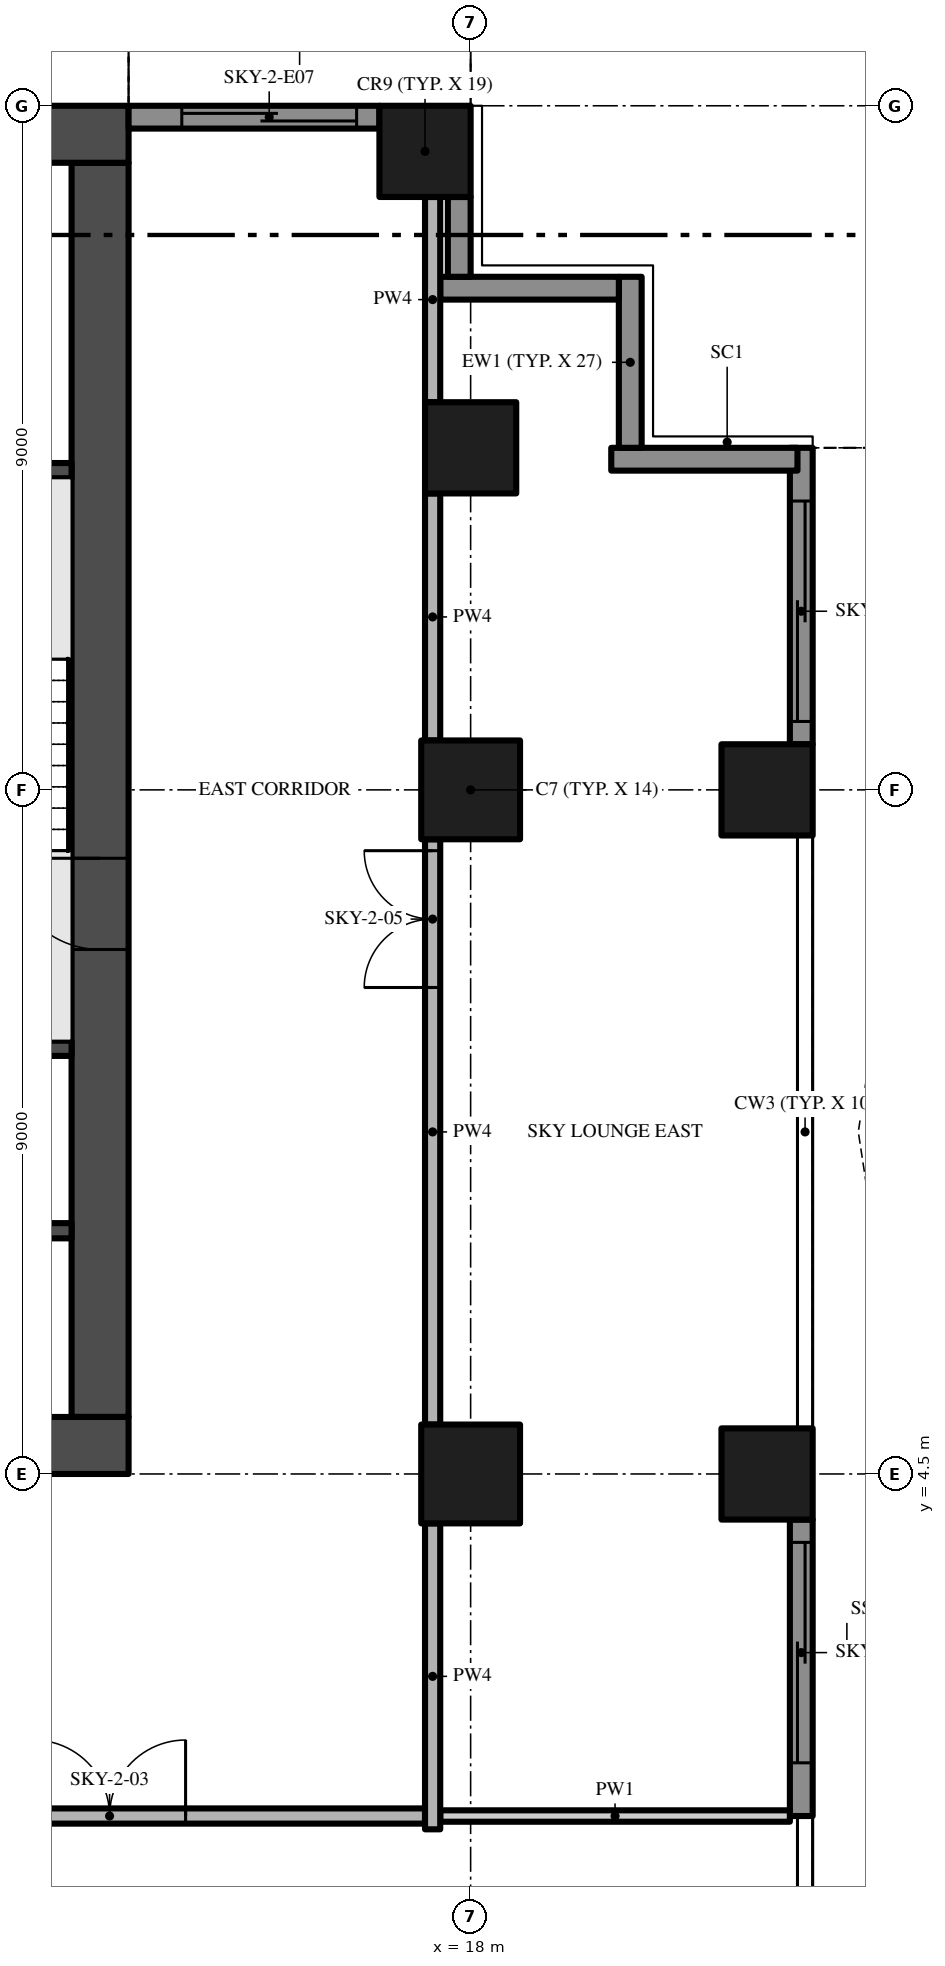
"""IFC4 building model, lengths in metres.
Left out: names, types, materials, properties, quantities, classifications, styles, units other than length and angle.
Written with IfcOpenShell. Run it as: python <this file> out.ifc"""

import sys

from ifc_helpers import new_model, si_unit, direction, frame, frame_2d, origin, origin_2d, place, context, subcontext, project, spatial, polyline, rectangle, outline, extrude, element, fill, save


model = new_model("IFC4")
c1 = context("Model", 3, precision=1e-05, world=origin(), true_north=direction((0.0, 1.0)))
c2 = subcontext(c1, "Body", "Model", "MODEL_VIEW")
j1 = project(units=[si_unit("LENGTHUNIT", "METRE"), si_unit("PLANEANGLEUNIT", "RADIAN")], contexts=[c1])
p1 = place(None, origin())
s1 = spatial("IfcSite", under=j1, at=p1, CompositionType="ELEMENT")
p2 = place(p1, origin())
s2 = spatial("IfcBuilding", under=s1, at=p2, CompositionType="ELEMENT")
p3 = place(p2, frame((0.0, 0.0, 120.0)))
s3 = spatial("IfcBuildingStorey", under=s2, at=p3, CompositionType="ELEMENT", Elevation=120.0)
p4 = place(p3, frame((-13.5, 4.875, -0.3), z_axis=(0.0, 0.0, 1.0), x_axis=(1.0, 0.0, 0.0)))
e1 = element("IfcWall", 1, at=p4, inside=s3, PredefinedType="SHEAR", context=c2, shape_type="SweptSolid", body=[
    extrude(rectangle(XDim=27.0, YDim=0.75, at=frame_2d((13.5, 0.0))), origin(), (0.0, 0.0, 1.0), 5.0),
])
p5 = place(p4, frame((12.0, 0.0, 0.3)))
e2 = element("IfcOpeningElement", 2, at=p5, cuts=e1, PredefinedType="OPENING", context=c2, shape_type="SweptSolid", body=[
    extrude(rectangle(XDim=3.0, YDim=2.4, at=frame_2d((1.5, 1.2))), frame((0.0, 0.385, 0.0), z_axis=(0.0, -1.0, 0.0), x_axis=(1.0, 0.0, 0.0)), (0.0, 0.0, 1.0), 0.77),
])
p6 = place(p4, frame((4.9, 0.0, 0.3)))
e3 = element("IfcOpeningElement", 3, at=p6, cuts=e1, PredefinedType="OPENING", context=c2, shape_type="SweptSolid", body=[
    extrude(rectangle(XDim=1.2, YDim=2.2, at=frame_2d((0.6, 1.1))), frame((0.0, 0.385, 0.0), z_axis=(0.0, -1.0, 0.0), x_axis=(1.0, 0.0, 0.0)), (0.0, 0.0, 1.0), 0.77),
])
p7 = place(p4, frame((20.75, 0.0, 0.3)))
e4 = element("IfcOpeningElement", 4, at=p7, cuts=e1, PredefinedType="OPENING", context=c2, shape_type="SweptSolid", body=[
    extrude(rectangle(XDim=1.5, YDim=2.2, at=frame_2d((0.75, 1.1))), frame((0.0, 0.385, 0.0), z_axis=(0.0, -1.0, 0.0), x_axis=(1.0, 0.0, 0.0)), (0.0, 0.0, 1.0), 0.77),
])
p8 = place(p4, frame((17.4, 0.0, 0.3)))
e5 = element("IfcOpeningElement", 5, at=p8, cuts=e1, PredefinedType="OPENING", context=c2, shape_type="SweptSolid", body=[
    extrude(rectangle(XDim=1.2, YDim=2.2, at=frame_2d((0.6, 1.1))), frame((0.0, 0.385, 0.0), z_axis=(0.0, -1.0, 0.0), x_axis=(1.0, 0.0, 0.0)), (0.0, 0.0, 1.0), 0.77),
])
p9 = place(p3, frame((13.125, 5.25, -0.3), z_axis=(0.0, 0.0, 1.0), x_axis=(0.0, 1.0, 0.0)))
e6 = element("IfcWall", 6, at=p9, inside=s3, PredefinedType="SHEAR", context=c2, shape_type="SweptSolid", body=[
    extrude(rectangle(XDim=16.5, YDim=0.75, at=frame_2d((8.25, 0.0))), origin(), (0.0, 0.0, 1.0), 5.0),
])
p10 = place(p9, frame((6.15, 0.0, 0.3)))
e7 = element("IfcOpeningElement", 7, at=p10, cuts=e6, PredefinedType="OPENING", context=c2, shape_type="SweptSolid", body=[
    extrude(rectangle(XDim=1.2, YDim=2.2, at=frame_2d((0.6, 1.1))), frame((0.0, 0.385, 0.0), z_axis=(0.0, -1.0, 0.0), x_axis=(1.0, 0.0, 0.0)), (0.0, 0.0, 1.0), 0.77),
])
p11 = place(p3, frame((13.5, 22.125, -0.3), z_axis=(0.0, 0.0, 1.0), x_axis=(-1.0, 0.0, 0.0)))
e8 = element("IfcWall", 8, at=p11, inside=s3, PredefinedType="SHEAR", context=c2, shape_type="SweptSolid", body=[
    extrude(rectangle(XDim=27.0, YDim=0.75, at=frame_2d((13.5, 0.0))), origin(), (0.0, 0.0, 1.0), 5.0),
])
p12 = place(p3, frame((18.0, 13.5, 0.0), z_axis=(0.0, 0.0, 1.0), x_axis=(1.0, 0.0, 0.0)))
e9 = element("IfcColumn", 9, at=p12, inside=s3, PredefinedType="COLUMN", context=c2, shape_type="SweptSolid", body=[
    extrude(rectangle(XDim=1.3, YDim=1.3, at=origin_2d()), origin(), (0.0, 0.0, 1.0), 4.7),
])
p13 = place(p3, frame((17.4, 21.9, 0.0), z_axis=(0.0, 0.0, 1.0), x_axis=(1.0, 0.0, 0.0)))
e10 = element("IfcColumn", 10, at=p13, inside=s3, PredefinedType="COLUMN", context=c2, shape_type="SweptSolid", body=[
    extrude(rectangle(XDim=1.2, YDim=1.2, at=origin_2d()), origin(), (0.0, 0.0, 1.0), 4.7),
])
p14 = place(p3, frame((18.0, 4.5, 0.0), z_axis=(0.0, 0.0, 1.0), x_axis=(1.0, 0.0, 0.0)))
e11 = element("IfcColumn", 11, at=p14, inside=s3, PredefinedType="COLUMN", context=c2, shape_type="SweptSolid", body=[
    extrude(rectangle(XDim=1.3, YDim=1.3, at=origin_2d()), origin(), (0.0, 0.0, 1.0), 4.7),
])
for number, where, z_axis, x_axis in (
    (12, (21.9, 13.5, 0.0), (0.0, 0.0, 1.0), (1.0, 0.0, 0.0)),
    (13, (18.0, 18.0, 0.0), (0.0, 0.0, 1.0), (1.0, 0.0, 0.0)),
    (14, (21.9, 4.5, 0.0), (0.0, 0.0, 1.0), (1.0, 0.0, 0.0)),
):
    element("IfcColumn", number, at=place(p3, frame(where, z_axis=z_axis, x_axis=x_axis)), inside=s3, PredefinedType="COLUMN", context=c2, shape_type="SweptSolid", body=[
        extrude(rectangle(XDim=1.2, YDim=1.2, at=origin_2d()), origin(), (0.0, 0.0, 1.0), 4.7),
    ])
p15 = place(p3, frame((22.35, 3.9, 0.0), z_axis=(0.0, 0.0, 1.0), x_axis=(0.0, -1.0, 0.0)))
e15 = element("IfcWall", 15, at=p15, inside=s3, PredefinedType="SOLIDWALL", context=c2, shape_type="SweptSolid", body=[
    extrude(rectangle(XDim=3.9, YDim=0.3, at=frame_2d((1.95, 0.0))), origin(), (0.0, 0.0, 1.0), 4.7),
])
p16 = place(p15, frame((0.3, 0.0, 0.0)))
e16 = element("IfcOpeningElement", 16, at=p16, cuts=e15, PredefinedType="OPENING", context=c2, shape_type="SweptSolid", body=[
    extrude(rectangle(XDim=2.9, YDim=2.4, at=frame_2d((1.45, 1.2))), frame((0.0, 0.16, 0.0), z_axis=(0.0, -1.0, 0.0), x_axis=(1.0, 0.0, 0.0)), (0.0, 0.0, 1.0), 0.32),
])
p17 = place(p3, frame((22.35, 18.0, 0.0), z_axis=(0.0, 0.0, 1.0), x_axis=(0.0, -1.0, 0.0)))
e17 = element("IfcWall", 17, at=p17, inside=s3, PredefinedType="SOLIDWALL", context=c2, shape_type="SweptSolid", body=[
    extrude(rectangle(XDim=3.9, YDim=0.3, at=frame_2d((1.95, 0.0))), origin(), (0.0, 0.0, 1.0), 4.7),
])
p18 = place(p17, frame((0.7, 0.0, 0.0)))
e18 = element("IfcOpeningElement", 18, at=p18, cuts=e17, PredefinedType="OPENING", context=c2, shape_type="SweptSolid", body=[
    extrude(rectangle(XDim=2.9, YDim=2.4, at=frame_2d((1.45, 1.2))), frame((0.0, 0.16, 0.0), z_axis=(0.0, -1.0, 0.0), x_axis=(1.0, 0.0, 0.0)), (0.0, 0.0, 1.0), 0.32),
])
p19 = place(p3, frame((19.85, 17.85, 0.0), z_axis=(0.0, 0.0, 1.0), x_axis=(1.0, 0.0, 0.0)))
e19 = element("IfcWall", 19, at=p19, inside=s3, PredefinedType="SOLIDWALL", context=c2, shape_type="SweptSolid", body=[
    extrude(rectangle(XDim=2.45, YDim=0.3, at=frame_2d((1.225, 0.0))), origin(), (0.0, 0.0, 1.0), 4.7),
])
p20 = place(p3, frame((20.1, 20.25, 0.0), z_axis=(0.0, 0.0, 1.0), x_axis=(0.0, -1.0, 0.0)))
e20 = element("IfcWall", 20, at=p20, inside=s3, PredefinedType="SOLIDWALL", context=c2, shape_type="SweptSolid", body=[
    extrude(rectangle(XDim=2.25, YDim=0.3, at=frame_2d((1.125, 0.0))), origin(), (0.0, 0.0, 1.0), 4.7),
])
p21 = place(p3, frame((17.6, 20.1, 0.0), z_axis=(0.0, 0.0, 1.0), x_axis=(1.0, 0.0, 0.0)))
e21 = element("IfcWall", 21, at=p21, inside=s3, PredefinedType="SOLIDWALL", context=c2, shape_type="SweptSolid", body=[
    extrude(rectangle(XDim=2.35, YDim=0.3, at=frame_2d((1.175, 0.0))), origin(), (0.0, 0.0, 1.0), 4.7),
])
p22 = place(p3, frame((17.85, 21.3, 0.0), z_axis=(0.0, 0.0, 1.0), x_axis=(0.0, -1.0, 0.0)))
e22 = element("IfcWall", 22, at=p22, inside=s3, PredefinedType="SOLIDWALL", context=c2, shape_type="SweptSolid", body=[
    extrude(rectangle(XDim=1.05, YDim=0.3, at=frame_2d((0.525, 0.0))), origin(), (0.0, 0.0, 1.0), 4.7),
])
p23 = place(p3, frame((13.5, 22.35, 0.0), z_axis=(0.0, 0.0, 1.0), x_axis=(1.0, 0.0, 0.0)))
e23 = element("IfcWall", 23, at=p23, inside=s3, PredefinedType="SOLIDWALL", context=c2, shape_type="SweptSolid", body=[
    extrude(rectangle(XDim=3.3, YDim=0.3, at=frame_2d((1.65, 0.0))), origin(), (0.0, 0.0, 1.0), 4.7),
])
p24 = place(p23, frame((0.7, 0.0, 0.0)))
e24 = element("IfcOpeningElement", 24, at=p24, cuts=e23, PredefinedType="OPENING", context=c2, shape_type="SweptSolid", body=[
    extrude(rectangle(XDim=2.3, YDim=2.4, at=frame_2d((1.15, 1.2))), frame((0.0, 0.16, 0.0), z_axis=(0.0, -1.0, 0.0), x_axis=(1.0, 0.0, 0.0)), (0.0, 0.0, 1.0), 0.32),
])
p25 = place(p3, origin())
e25 = element("IfcWall", 25, at=p25, inside=s3, PredefinedType="USERDEFINED", context=c2, shape_type="SweptSolid", body=[
    extrude(outline(polyline([(25.5, -13.5), (25.271, -12.0), (24.671, -10.5), (23.929, -9.0), (23.329, -7.5), (23.1, -6.0), (23.329, -4.5), (23.929, -3.0), (24.671, -1.5), (25.271, 0.0), (25.5, 1.5), (25.271, 3.0), (24.671, 4.5), (23.929, 6.0), (23.329, 7.5), (23.1, 9.0), (23.329, 10.5), (23.929, 12.0), (24.671, 13.5), (25.271, 15.0), (25.5, 16.5), (25.271, 18.0), (25.024, 17.962), (25.247, 16.5), (25.028, 15.066), (24.442, 13.602), (23.701, 12.102), (23.086, 10.566), (22.847, 9.0), (23.086, 7.434), (23.701, 5.898), (24.442, 4.398), (25.028, 2.934), (25.247, 1.5), (25.028, 0.066), (24.442, -1.398), (23.701, -2.898), (23.086, -4.434), (22.847, -6.0), (23.086, -7.566), (23.701, -9.102), (24.442, -10.602), (25.028, -12.066), (25.253, -13.538), (25.5, -13.5)])), origin(), (0.0, 0.0, 1.0), 0.9),
])
for number, where, z_axis, x_axis in (
    (26, (9.65, 7.7, 0.0), (0.0, 0.0, 1.0), (1.0, 0.0, 0.0)),
    (27, (9.65, 10.1, 0.0), (0.0, 0.0, 1.0), (1.0, 0.0, 0.0)),
    (28, (9.65, 17.7, 0.0), (0.0, 0.0, 1.0), (1.0, 0.0, 0.0)),
):
    element("IfcWall", number, at=place(p3, frame(where, z_axis=z_axis, x_axis=x_axis)), inside=s3, PredefinedType="SHEAR", context=c2, shape_type="SweptSolid", body=[
        extrude(rectangle(XDim=3.1, YDim=0.2, at=frame_2d((1.55, 0.0))), origin(), (0.0, 0.0, 1.0), 4.7),
    ])
p26 = place(p3, frame((-17.4, 0.0, 0.0), z_axis=(0.0, 0.0, 1.0), x_axis=(1.0, 0.0, 0.0)))
e29 = element("IfcWall", 29, at=p26, inside=s3, PredefinedType="PARTITIONING", context=c2, shape_type="SweptSolid", body=[
    extrude(rectangle(XDim=34.8, YDim=0.2, at=frame_2d((17.4, 0.0))), origin(), (0.0, 0.0, 1.0), 4.7),
])
p27 = place(p26, frame((3.15, 0.0, 0.0)))
e30 = element("IfcOpeningElement", 30, at=p27, cuts=e29, PredefinedType="OPENING", context=c2, shape_type="SweptSolid", body=[
    extrude(rectangle(XDim=2.0, YDim=2.4, at=frame_2d((1.0, 1.2))), frame((0.0, 0.11, 0.0), z_axis=(0.0, -1.0, 0.0), x_axis=(1.0, 0.0, 0.0)), (0.0, 0.0, 1.0), 0.22),
])
p28 = place(p26, frame((16.4, 0.0, 0.0)))
e31 = element("IfcOpeningElement", 31, at=p28, cuts=e29, PredefinedType="OPENING", context=c2, shape_type="SweptSolid", body=[
    extrude(rectangle(XDim=2.0, YDim=2.4, at=frame_2d((1.0, 1.2))), frame((0.0, 0.11, 0.0), z_axis=(0.0, -1.0, 0.0), x_axis=(1.0, 0.0, 0.0)), (0.0, 0.0, 1.0), 0.22),
])
p29 = place(p26, frame((29.65, 0.0, 0.0)))
e32 = element("IfcOpeningElement", 32, at=p29, cuts=e29, PredefinedType="OPENING", context=c2, shape_type="SweptSolid", body=[
    extrude(rectangle(XDim=2.0, YDim=2.4, at=frame_2d((1.0, 1.2))), frame((0.0, 0.11, 0.0), z_axis=(0.0, -1.0, 0.0), x_axis=(1.0, 0.0, 0.0)), (0.0, 0.0, 1.0), 0.22),
])
p30 = place(p3, frame((17.6, 0.0, 0.0), z_axis=(0.0, 0.0, 1.0), x_axis=(1.0, 0.0, 0.0)))
e33 = element("IfcWall", 33, at=p30, inside=s3, PredefinedType="PARTITIONING", context=c2, shape_type="SweptSolid", body=[
    extrude(rectangle(XDim=4.6, YDim=0.15, at=frame_2d((2.3, 0.0))), origin(), (0.0, 0.0, 1.0), 4.7),
])
p31 = place(p3, frame((17.5, -0.175, 0.0), z_axis=(0.0, 0.0, 1.0), x_axis=(0.0, 1.0, 0.0)))
e34 = element("IfcWall", 34, at=p31, inside=s3, PredefinedType="PARTITIONING", context=c2, shape_type="SweptSolid", body=[
    extrude(rectangle(XDim=4.025, YDim=0.2, at=frame_2d((2.013, 0.0))), origin(), (0.0, 0.0, 1.0), 4.7),
])
p32 = place(p3, frame((17.5, 5.15, 0.0), z_axis=(0.0, 0.0, 1.0), x_axis=(0.0, 1.0, 0.0)))
e35 = element("IfcWall", 35, at=p32, inside=s3, PredefinedType="PARTITIONING", context=c2, shape_type="SweptSolid", body=[
    extrude(rectangle(XDim=7.7, YDim=0.2, at=frame_2d((3.85, 0.0))), origin(), (0.0, 0.0, 1.0), 4.7),
])
p33 = place(p32, frame((5.75, 0.0, 0.0)))
e36 = element("IfcOpeningElement", 36, at=p33, cuts=e35, PredefinedType="OPENING", context=c2, shape_type="SweptSolid", body=[
    extrude(rectangle(XDim=1.8, YDim=2.4, at=frame_2d((0.9, 1.2))), frame((0.0, 0.11, 0.0), z_axis=(0.0, -1.0, 0.0), x_axis=(1.0, 0.0, 0.0)), (0.0, 0.0, 1.0), 0.22),
])
p34 = place(p3, frame((17.5, 14.15, 0.0), z_axis=(0.0, 0.0, 1.0), x_axis=(0.0, 1.0, 0.0)))
e37 = element("IfcWall", 37, at=p34, inside=s3, PredefinedType="PARTITIONING", context=c2, shape_type="SweptSolid", body=[
    extrude(rectangle(XDim=3.25, YDim=0.2, at=frame_2d((1.625, 0.0))), origin(), (0.0, 0.0, 1.0), 4.7),
])
p35 = place(p3, frame((17.5, 18.6, 0.0), z_axis=(0.0, 0.0, 1.0), x_axis=(0.0, 1.0, 0.0)))
e38 = element("IfcWall", 38, at=p35, inside=s3, PredefinedType="PARTITIONING", context=c2, shape_type="SweptSolid", body=[
    extrude(rectangle(XDim=2.7, YDim=0.2, at=frame_2d((1.35, 0.0))), origin(), (0.0, 0.0, 1.0), 4.7),
])
p36 = place(p16, origin())
e39 = element("IfcDoor", 39, at=p36, inside=s3, OperationType="SINGLE_SWING_LEFT", PredefinedType="DOOR", context=c2, shape_type="SweptSolid", body=[
    extrude(rectangle(XDim=2.9, YDim=2.4, at=frame_2d((1.45, 1.2))), frame((0.0, 0.025, 0.0), z_axis=(0.0, -1.0, 0.0), x_axis=(1.0, 0.0, 0.0)), (0.0, 0.0, 1.0), 0.05),
])
fill(e16, e39)
p37 = place(p18, origin())
e40 = element("IfcDoor", 40, at=p37, inside=s3, OperationType="SINGLE_SWING_LEFT", PredefinedType="DOOR", context=c2, shape_type="SweptSolid", body=[
    extrude(rectangle(XDim=2.9, YDim=2.4, at=frame_2d((1.45, 1.2))), frame((0.0, 0.025, 0.0), z_axis=(0.0, -1.0, 0.0), x_axis=(1.0, 0.0, 0.0)), (0.0, 0.0, 1.0), 0.05),
])
fill(e18, e40)
p38 = place(p24, origin())
e41 = element("IfcDoor", 41, at=p38, inside=s3, OperationType="SINGLE_SWING_LEFT", PredefinedType="DOOR", context=c2, shape_type="SweptSolid", body=[
    extrude(rectangle(XDim=2.3, YDim=2.4, at=frame_2d((1.15, 1.2))), frame((0.0, 0.025, 0.0), z_axis=(0.0, -1.0, 0.0), x_axis=(1.0, 0.0, 0.0)), (0.0, 0.0, 1.0), 0.05),
])
fill(e24, e41)
p39 = place(p10, frame((1.2, 0.0, 0.0), z_axis=(0.0, 0.0, 1.0), x_axis=(-1.0, 0.0, 0.0)))
e42 = element("IfcDoor", 42, at=p39, inside=s3, OperationType="SINGLE_SWING_LEFT", PredefinedType="DOOR", context=c2, shape_type="SweptSolid", body=[
    extrude(rectangle(XDim=1.2, YDim=2.2, at=frame_2d((0.6, 1.1))), frame((0.0, 0.025, 0.0), z_axis=(0.0, -1.0, 0.0), x_axis=(1.0, 0.0, 0.0)), (0.0, 0.0, 1.0), 0.05),
])
fill(e7, e42)
p40 = place(p29, origin())
e43 = element("IfcDoor", 43, at=p40, inside=s3, OperationType="DOUBLE_DOOR_SINGLE_SWING", PredefinedType="DOOR", context=c2, shape_type="SweptSolid", body=[
    extrude(rectangle(XDim=2.0, YDim=2.4, at=frame_2d((1.0, 1.2))), frame((0.0, 0.025, 0.0), z_axis=(0.0, -1.0, 0.0), x_axis=(1.0, 0.0, 0.0)), (0.0, 0.0, 1.0), 0.05),
])
fill(e32, e43)
p41 = place(p33, origin())
e44 = element("IfcDoor", 44, at=p41, inside=s3, OperationType="DOUBLE_DOOR_SINGLE_SWING", PredefinedType="DOOR", context=c2, shape_type="SweptSolid", body=[
    extrude(rectangle(XDim=1.8, YDim=2.4, at=frame_2d((0.9, 1.2))), frame((0.0, 0.025, 0.0), z_axis=(0.0, -1.0, 0.0), x_axis=(1.0, 0.0, 0.0)), (0.0, 0.0, 1.0), 0.05),
])
fill(e36, e44)
save(model, sys.argv[1])
